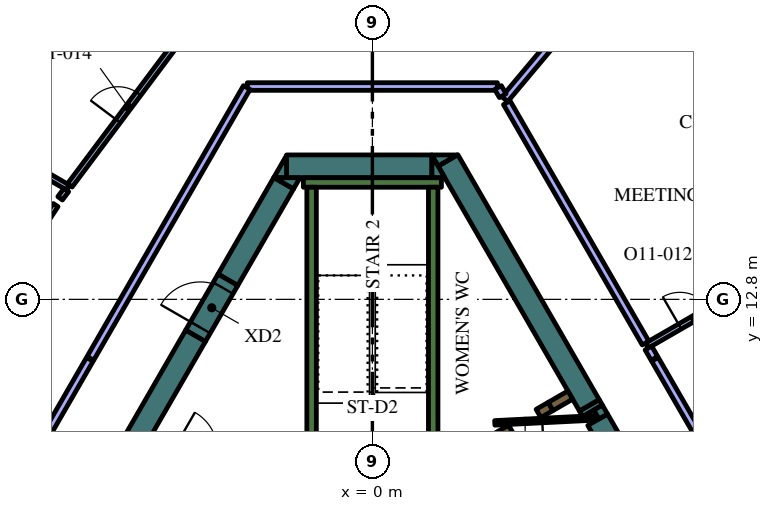
"""IFC4 building model, lengths in metres.
Left out: names, types, materials, properties, quantities, classifications, styles, units other than length and angle.
Written with IfcOpenShell. Run it as: python <this file> out.ifc"""

import sys

from ifc_helpers import new_model, si_unit, direction, frame, frame_2d, origin, place, context, subcontext, project, spatial, polyline, rectangle, outline, extrude, element, fill, save


model = new_model("IFC4")
c1 = context("Model", 3, precision=1e-05, world=origin(), true_north=direction((0.0, 1.0)))
c2 = subcontext(c1, "Body", "Model", "MODEL_VIEW")
j1 = project(units=[si_unit("LENGTHUNIT", "METRE"), si_unit("PLANEANGLEUNIT", "RADIAN")], contexts=[c1])
p1 = place(None, origin())
s1 = spatial("IfcSite", under=j1, at=p1, CompositionType="ELEMENT")
p2 = place(p1, origin())
s2 = spatial("IfcBuilding", under=s1, at=p2, CompositionType="ELEMENT")
p3 = place(p2, frame((0.0, 0.0, 267.0)))
s3 = spatial("IfcBuildingStorey", under=s2, at=p3, CompositionType="ELEMENT", Elevation=267.0)
p4 = place(p3, frame((5.709, 10.012, 0.0), z_axis=(0.0, 0.0, 1.0), x_axis=(0.500399834964, -0.865794435861, 0.0)))
e1 = element("IfcWall", 1, at=p4, inside=s3, PredefinedType="SOLIDWALL", context=c2, shape_type="SweptSolid", body=[
    extrude(rectangle(XDim=0.166, YDim=0.6, at=frame_2d((0.083, 0.0))), origin(), (0.0, 0.0, 1.0), 4.2),
])
p5 = place(p3, frame((5.928, 9.633, 0.0), z_axis=(0.0, 0.0, 1.0), x_axis=(0.499983823482, -0.8660347431, 0.0)))
e2 = element("IfcWall", 2, at=p5, inside=s3, PredefinedType="SOLIDWALL", context=c2, shape_type="SweptSolid", body=[
    extrude(rectangle(XDim=4.528, YDim=0.6, at=frame_2d((2.264, 0.0))), origin(), (0.0, 0.0, 1.0), 4.2),
])
p6 = place(p3, origin())
e3 = element("IfcWall", 3, at=p6, inside=s3, PredefinedType="SOLIDWALL", context=c2, shape_type="SweptSolid", body=[
    extrude(outline(polyline([(6.053, 10.016), (6.187, 9.784), (5.961, 9.654), (5.827, 9.886), (6.053, 10.016)])), origin(), (0.0, 0.0, 1.0), 4.2),
])
p7 = place(p3, frame((1.989, 16.456, 0.0), z_axis=(0.0, 0.0, 1.0), x_axis=(0.499990476767, -0.866030901956, 0.0)))
e4 = element("IfcWall", 4, at=p7, inside=s3, PredefinedType="SOLIDWALL", context=c2, shape_type="SweptSolid", body=[
    extrude(rectangle(XDim=7.438, YDim=0.6, at=frame_2d((3.719, 0.0))), origin(), (0.0, 0.0, 1.0), 4.2),
])
e5 = element("IfcWall", 5, at=p6, inside=s3, PredefinedType="SOLIDWALL", context=c2, shape_type="SweptSolid", body=[
    extrude(outline(polyline([(1.559, 16.6), (2.235, 16.6), (1.728, 16.307), (1.559, 16.6)])), origin(), (0.0, 0.0, 1.0), 4.2),
])
p8 = place(p3, frame((-2.258, 16.3, 0.0), z_axis=(0.0, 0.0, 1.0), x_axis=(1.0, 0.0, 0.0)))
e6 = element("IfcWall", 6, at=p8, inside=s3, PredefinedType="SOLIDWALL", context=c2, shape_type="SweptSolid", body=[
    extrude(rectangle(XDim=3.823, YDim=0.6, at=frame_2d((1.912, 0.0))), origin(), (0.0, 0.0, 1.0), 4.2),
])
e7 = element("IfcWall", 7, at=p6, inside=s3, PredefinedType="SOLIDWALL", context=c2, shape_type="SweptSolid", body=[
    extrude(outline(polyline([(1.905, 16.0), (1.567, 16.0), (1.567, 16.585), (1.905, 16.0)])), origin(), (0.0, 0.0, 1.0), 4.2),
])
e8 = element("IfcWall", 8, at=p6, inside=s3, PredefinedType="SOLIDWALL", context=c2, shape_type="SweptSolid", body=[
    extrude(outline(polyline([(-2.598, 16.0), (-2.26, 16.585), (-2.26, 16.0), (-2.598, 16.0)])), origin(), (0.0, 0.0, 1.0), 4.2),
])
p9 = place(p3, frame((-2.335, 15.855, 0.0), z_axis=(0.0, 0.0, 1.0), x_axis=(-0.499960127962, -0.866048422692, 0.0)))
e9 = element("IfcWall", 9, at=p9, inside=s3, PredefinedType="SOLIDWALL", context=c2, shape_type="SweptSolid", body=[
    extrude(rectangle(XDim=2.934, YDim=0.6, at=frame_2d((1.467, 0.0))), origin(), (0.0, 0.0, 1.0), 4.2),
])
e10 = element("IfcWall", 10, at=p6, inside=s3, PredefinedType="SOLIDWALL", context=c2, shape_type="SweptSolid", body=[
    extrude(outline(polyline([(-1.905, 16.0), (-2.074, 15.707), (-2.581, 16.0), (-1.905, 16.0)])), origin(), (0.0, 0.0, 1.0), 4.2),
])
p10 = place(p3, frame((-4.652, 11.842, 0.0), z_axis=(0.0, 0.0, 1.0), x_axis=(-0.500003640647, -0.866023301845, 0.0)))
e11 = element("IfcWall", 11, at=p10, inside=s3, PredefinedType="SOLIDWALL", context=c2, shape_type="SweptSolid", body=[
    extrude(rectangle(XDim=15.858, YDim=0.6, at=frame_2d((7.929, 0.0))), origin(), (0.0, 0.0, 1.0), 4.2),
])
p11 = place(p3, frame((-1.817, 15.875, 0.0), z_axis=(0.0, 0.0, 1.0), x_axis=(1.0, 0.0, 0.0)))
e12 = element("IfcWall", 12, at=p11, inside=s3, PredefinedType="SOLIDWALL", context=c2, shape_type="SweptSolid", body=[
    extrude(rectangle(XDim=3.634, YDim=0.25, at=frame_2d((1.817, 0.0))), origin(), (0.0, 0.0, 1.0), 4.2),
])
p12 = place(p3, frame((1.6, 8.95, 0.0), z_axis=(0.0, 0.0, 1.0), x_axis=(0.0, 1.0, 0.0)))
e13 = element("IfcWall", 13, at=p12, inside=s3, PredefinedType="SOLIDWALL", context=c2, shape_type="SweptSolid", body=[
    extrude(rectangle(XDim=6.8, YDim=0.25, at=frame_2d((3.4, 0.0))), origin(), (0.0, 0.0, 1.0), 4.2),
])
p13 = place(p3, frame((-1.6, 8.7, 0.0), z_axis=(0.0, 0.0, 1.0), x_axis=(0.0, 1.0, 0.0)))
e14 = element("IfcWall", 14, at=p13, inside=s3, PredefinedType="SOLIDWALL", context=c2, shape_type="SweptSolid", body=[
    extrude(rectangle(XDim=7.05, YDim=0.25, at=frame_2d((3.525, 0.0))), origin(), (0.0, 0.0, 1.0), 4.2),
])
p14 = place(p3, frame((3.647, 9.38, 0.0), z_axis=(0.0, 0.0, 1.0), x_axis=(-0.866025015791, -0.500000672024, 0.0)))
e15 = element("IfcWall", 15, at=p14, inside=s3, PredefinedType="SOLIDWALL", context=c2, shape_type="SweptSolid", body=[
    extrude(rectangle(XDim=3.849, YDim=0.25, at=frame_2d((1.924, 0.0))), origin(), (0.0, 0.0, 1.0), 4.2),
])
p15 = place(p3, frame((4.688, 9.981, 0.0), z_axis=(0.0, 0.0, 1.0), x_axis=(-0.865974312977, -0.500088481434, 0.0)))
e16 = element("IfcWall", 16, at=p15, inside=s3, PredefinedType="SOLIDWALL", context=c2, shape_type="SweptSolid", body=[
    extrude(rectangle(XDim=0.366, YDim=0.25, at=frame_2d((0.183, 0.0))), origin(), (0.0, 0.0, 1.0), 4.2),
])
p16 = place(p3, frame((4.689, 9.982, 0.0), z_axis=(0.0, 0.0, 1.0), x_axis=(0.865947592822, 0.500134748329, 0.0)))
e17 = element("IfcWall", 17, at=p16, inside=s3, PredefinedType="SOLIDWALL", context=c2, shape_type="SweptSolid", body=[
    extrude(rectangle(XDim=0.598, YDim=0.25, at=frame_2d((0.299, 0.0))), origin(), (0.0, 0.0, 1.0), 4.2),
])
p17 = place(p3, frame((5.917, 9.684, 0.0), z_axis=(0.0, 0.0, 1.0), x_axis=(-0.998758194515, -0.049820366212, 0.0)))
e18 = element("IfcWall", 18, at=p17, inside=s3, PredefinedType="PARTITIONING", context=c2, shape_type="SweptSolid", body=[
    extrude(rectangle(XDim=2.7, YDim=0.12, at=frame_2d((1.35, 0.0))), origin(), (0.0, 0.0, 1.0), 3.55),
])
p18 = place(p17, frame((1.45, 0.0, 0.0)))
e19 = element("IfcOpeningElement", 19, at=p18, cuts=e18, PredefinedType="OPENING", context=c2, shape_type="SweptSolid", body=[
    extrude(rectangle(XDim=0.9, YDim=2.1, at=frame_2d((0.45, 1.05))), frame((0.0, 0.07, 0.0), z_axis=(0.0, -1.0, 0.0), x_axis=(1.0, 0.0, 0.0)), (0.0, 0.0, 1.0), 0.14),
])
p19 = place(p3, frame((-4.652, 11.842, 0.0), z_axis=(0.0, 0.0, 1.0), x_axis=(0.500062241894, 0.865989465428, 0.0)))
e20 = element("IfcWall", 20, at=p19, inside=s3, PredefinedType="SOLIDWALL", context=c2, shape_type="SweptSolid", body=[
    extrude(rectangle(XDim=1.7, YDim=0.6, at=frame_2d((0.85, 0.0))), origin(), (0.0, 0.0, 1.0), 4.2),
])
p20 = place(p19, frame((0.25, 0.0, 0.0)))
e21 = element("IfcOpeningElement", 21, at=p20, cuts=e20, PredefinedType="OPENING", context=c2, shape_type="SweptSolid", body=[
    extrude(rectangle(XDim=1.2, YDim=2.1, at=frame_2d((0.6, 1.05))), frame((0.0, 0.31, 0.0), z_axis=(0.0, -1.0, 0.0), x_axis=(1.0, 0.0, 0.0)), (0.0, 0.0, 1.0), 0.62),
])
p21 = place(p3, frame((7.226, 11.585, 0.0), z_axis=(0.0, 0.0, 1.0), x_axis=(0.866021079084, 0.500007490527, 0.0)))
e22 = element("IfcWall", 22, at=p21, inside=s3, PredefinedType="PARTITIONING", context=c2, shape_type="SweptSolid", body=[
    extrude(rectangle(XDim=2.892, YDim=0.15, at=frame_2d((1.446, 0.0))), origin(), (0.0, 0.0, 1.0), 3.55),
])
p22 = place(p21, frame((1.0, 0.0, 0.0)))
e23 = element("IfcOpeningElement", 23, at=p22, cuts=e22, PredefinedType="OPENING", context=c2, shape_type="SweptSolid", body=[
    extrude(rectangle(XDim=0.9, YDim=2.1, at=frame_2d((0.45, 1.05))), frame((0.0, 0.085, 0.0), z_axis=(0.0, -1.0, 0.0), x_axis=(1.0, 0.0, 0.0)), (0.0, 0.0, 1.0), 0.17),
])
p23 = place(p3, frame((13.436, 0.829, 0.0), z_axis=(0.0, 0.0, 1.0), x_axis=(-0.49999894854, 0.866026010844, 0.0)))
e24 = element("IfcWall", 24, at=p23, inside=s3, PredefinedType="PARTITIONING", context=c2, shape_type="SweptSolid", body=[
    extrude(rectangle(XDim=12.0, YDim=0.2, at=frame_2d((6.0, 0.0))), origin(), (0.0, 0.0, 1.0), 3.55),
])
p24 = place(p23, frame((5.5, 0.0, 0.0)))
e25 = element("IfcOpeningElement", 25, at=p24, cuts=e24, PredefinedType="OPENING", context=c2, shape_type="SweptSolid", body=[
    extrude(rectangle(XDim=1.0, YDim=2.1, at=frame_2d((0.5, 1.05))), frame((0.0, 0.11, 0.0), z_axis=(0.0, -1.0, 0.0), x_axis=(1.0, 0.0, 0.0)), (0.0, 0.0, 1.0), 0.22),
])
p25 = place(p3, frame((7.421, 11.247, 0.0), z_axis=(0.0, 0.0, 1.0), x_axis=(-0.500303403544, 0.865850162789, 0.0)))
e26 = element("IfcWall", 26, at=p25, inside=s3, PredefinedType="PARTITIONING", context=c2, shape_type="SweptSolid", body=[
    extrude(rectangle(XDim=0.315, YDim=0.2, at=frame_2d((0.158, 0.0))), origin(), (0.0, 0.0, 1.0), 3.55),
])
p26 = place(p3, frame((3.483, 18.067, 0.0), z_axis=(0.0, 0.0, 1.0), x_axis=(0.642896944312, 0.765952687177, 0.0)))
e27 = element("IfcWall", 27, at=p26, inside=s3, PredefinedType="PARTITIONING", context=c2, shape_type="SweptSolid", body=[
    extrude(rectangle(XDim=2.29, YDim=0.2, at=frame_2d((1.145, 0.0))), origin(), (0.0, 0.0, 1.0), 3.55),
])
p27 = place(p3, frame((7.188, 11.65, 0.0), z_axis=(0.0, 0.0, 1.0), x_axis=(-0.499989634868, 0.866031388014, 0.0)))
e28 = element("IfcWall", 28, at=p27, inside=s3, PredefinedType="PARTITIONING", context=c2, shape_type="SweptSolid", body=[
    extrude(rectangle(XDim=7.303, YDim=0.2, at=frame_2d((3.652, 0.0))), origin(), (0.0, 0.0, 1.0), 3.55),
])
p28 = place(p3, frame((-8.007, 15.74, 0.0), z_axis=(0.0, 0.0, 1.0), x_axis=(-0.866044607523, 0.499966736674, 0.0)))
e29 = element("IfcWall", 29, at=p28, inside=s3, PredefinedType="PARTITIONING", context=c2, shape_type="SweptSolid", body=[
    extrude(rectangle(XDim=3.115, YDim=0.15, at=frame_2d((1.557, 0.0))), origin(), (0.0, 0.0, 1.0), 3.55),
])
p29 = place(p3, frame((-7.962, 15.8, 0.0), z_axis=(0.0, 0.0, 1.0), x_axis=(0.599528135832, 0.800353680785, 0.0)))
e30 = element("IfcWall", 30, at=p29, inside=s3, PredefinedType="PARTITIONING", context=c2, shape_type="SweptSolid", body=[
    extrude(rectangle(XDim=5.217, YDim=0.15, at=frame_2d((2.608, 0.0))), origin(), (0.0, 0.0, 1.0), 3.55),
])
p30 = place(p29, frame((2.116, 0.0, 0.0)))
e31 = element("IfcOpeningElement", 31, at=p30, cuts=e30, PredefinedType="OPENING", context=c2, shape_type="SweptSolid", body=[
    extrude(rectangle(XDim=0.9, YDim=2.1, at=frame_2d((0.45, 1.05))), frame((0.0, 0.085, 0.0), z_axis=(0.0, -1.0, 0.0), x_axis=(1.0, 0.0, 0.0)), (0.0, 0.0, 1.0), 0.17),
])
p31 = place(p3, frame((-8.052, 15.679, 0.0), z_axis=(0.0, 0.0, 1.0), x_axis=(-0.599004157744, -0.800745914136, 0.0)))
e32 = element("IfcWall", 32, at=p31, inside=s3, PredefinedType="PARTITIONING", context=c2, shape_type="SweptSolid", body=[
    extrude(rectangle(XDim=0.275, YDim=0.15, at=frame_2d((0.137, 0.0))), origin(), (0.0, 0.0, 1.0), 3.55),
])
p32 = place(p3, frame((-11.628, 10.29, 0.0), z_axis=(0.0, 0.0, 1.0), x_axis=(0.55074607557, 0.834672846236, 0.0)))
e33 = element("IfcWall", 33, at=p32, inside=s3, PredefinedType="PARTITIONING", context=c2, shape_type="SweptSolid", body=[
    extrude(rectangle(XDim=5.979, YDim=0.15, at=frame_2d((2.99, 0.0))), origin(), (0.0, 0.0, 1.0), 3.55),
])
p33 = place(p32, frame((2.58, 0.0, 0.0)))
e34 = element("IfcOpeningElement", 34, at=p33, cuts=e33, PredefinedType="OPENING", context=c2, shape_type="SweptSolid", body=[
    extrude(rectangle(XDim=0.9, YDim=2.1, at=frame_2d((0.45, 1.05))), frame((0.0, 0.085, 0.0), z_axis=(0.0, -1.0, 0.0), x_axis=(1.0, 0.0, 0.0)), (0.0, 0.0, 1.0), 0.17),
])
p34 = place(p3, frame((-7.436, 11.221, 0.0), z_axis=(0.0, 0.0, 1.0), x_axis=(-0.49999894854, -0.866026010844, 0.0)))
e35 = element("IfcWall", 35, at=p34, inside=s3, PredefinedType="PARTITIONING", context=c2, shape_type="SweptSolid", body=[
    extrude(rectangle(XDim=12.0, YDim=0.2, at=frame_2d((6.0, 0.0))), origin(), (0.0, 0.0, 1.0), 3.55),
])
p35 = place(p34, frame((5.5, 0.0, 0.0)))
e36 = element("IfcOpeningElement", 36, at=p35, cuts=e35, PredefinedType="OPENING", context=c2, shape_type="SweptSolid", body=[
    extrude(rectangle(XDim=1.0, YDim=2.1, at=frame_2d((0.5, 1.05))), frame((0.0, 0.11, 0.0), z_axis=(0.0, -1.0, 0.0), x_axis=(1.0, 0.0, 0.0)), (0.0, 0.0, 1.0), 0.22),
])
p36 = place(p3, frame((3.291, 18.4, 0.0), z_axis=(0.0, 0.0, 1.0), x_axis=(-1.0, 0.0, 0.0)))
e37 = element("IfcWall", 37, at=p36, inside=s3, PredefinedType="PARTITIONING", context=c2, shape_type="SweptSolid", body=[
    extrude(rectangle(XDim=6.582, YDim=0.2, at=frame_2d((3.291, 0.0))), origin(), (0.0, 0.0, 1.0), 3.55),
])
p37 = place(p3, frame((-3.306, 18.374, 0.0), z_axis=(0.0, 0.0, 1.0), x_axis=(-0.499999798456, -0.866025520146, 0.0)))
e38 = element("IfcWall", 38, at=p37, inside=s3, PredefinedType="PARTITIONING", context=c2, shape_type="SweptSolid", body=[
    extrude(rectangle(XDim=8.229, YDim=0.2, at=frame_2d((4.115, 0.0))), origin(), (0.0, 0.0, 1.0), 3.55),
])
p38 = place(p3, frame((3.43, 18.159, 0.0), z_axis=(0.0, 0.0, 1.0), x_axis=(-0.499949632511, 0.866054481515, 0.0)))
e39 = element("IfcWall", 39, at=p38, inside=s3, PredefinedType="PARTITIONING", context=c2, shape_type="SweptSolid", body=[
    extrude(rectangle(XDim=0.248, YDim=0.2, at=frame_2d((0.124, 0.0))), origin(), (0.0, 0.0, 1.0), 3.55),
])
p39 = place(p3, frame((10.938, 17.99, 0.0), z_axis=(0.0, 0.0, 1.0), x_axis=(-0.599559865294, 0.800329911929, 0.0)))
e40 = element("IfcWall", 40, at=p39, inside=s3, PredefinedType="SOLIDWALL", context=c2, shape_type="SweptSolid", body=[
    extrude(rectangle(XDim=5.415, YDim=0.19, at=frame_2d((2.708, 0.0))), origin(), (0.0, 0.0, 1.0), 3.95),
])
p40 = place(p39, frame((0.358, 0.0, 0.6)))
e41 = element("IfcOpeningElement", 41, at=p40, cuts=e40, PredefinedType="OPENING", context=c2, shape_type="SweptSolid", body=[
    extrude(rectangle(XDim=1.5, YDim=2.85, at=frame_2d((0.75, 1.425))), frame((0.0, 0.105, 0.0), z_axis=(0.0, -1.0, 0.0), x_axis=(1.0, 0.0, 0.0)), (0.0, 0.0, 1.0), 0.21),
])
p41 = place(p39, frame((3.593, 0.0, 0.6)))
e42 = element("IfcOpeningElement", 42, at=p41, cuts=e40, PredefinedType="OPENING", context=c2, shape_type="SweptSolid", body=[
    extrude(rectangle(XDim=1.5, YDim=2.85, at=frame_2d((0.75, 1.425))), frame((0.0, 0.105, 0.0), z_axis=(0.0, -1.0, 0.0), x_axis=(1.0, 0.0, 0.0)), (0.0, 0.0, 1.0), 0.21),
])
p42 = place(p3, frame((-7.692, 22.324, 0.0), z_axis=(0.0, 0.0, 1.0), x_axis=(-0.599559865294, -0.800329911929, 0.0)))
e43 = element("IfcWall", 43, at=p42, inside=s3, PredefinedType="SOLIDWALL", context=c2, shape_type="SweptSolid", body=[
    extrude(rectangle(XDim=5.415, YDim=0.19, at=frame_2d((2.708, 0.0))), origin(), (0.0, 0.0, 1.0), 3.95),
])
p43 = place(p42, frame((0.323, 0.0, 0.6)))
e44 = element("IfcOpeningElement", 44, at=p43, cuts=e43, PredefinedType="OPENING", context=c2, shape_type="SweptSolid", body=[
    extrude(rectangle(XDim=1.5, YDim=2.85, at=frame_2d((0.75, 1.425))), frame((0.0, 0.105, 0.0), z_axis=(0.0, -1.0, 0.0), x_axis=(1.0, 0.0, 0.0)), (0.0, 0.0, 1.0), 0.21),
])
p44 = place(p42, frame((3.558, 0.0, 0.6)))
e45 = element("IfcOpeningElement", 45, at=p44, cuts=e43, PredefinedType="OPENING", context=c2, shape_type="SweptSolid", body=[
    extrude(rectangle(XDim=1.5, YDim=2.85, at=frame_2d((0.75, 1.425))), frame((0.0, 0.105, 0.0), z_axis=(0.0, -1.0, 0.0), x_axis=(1.0, 0.0, 0.0)), (0.0, 0.0, 1.0), 0.21),
])
p45 = place(p18, origin())
e46 = element("IfcDoor", 46, at=p45, inside=s3, OperationType="SINGLE_SWING_LEFT", PredefinedType="DOOR", context=c2, shape_type="SweptSolid", body=[
    extrude(rectangle(XDim=0.9, YDim=2.1, at=frame_2d((0.45, 1.05))), frame((0.0, 0.025, 0.0), z_axis=(0.0, -1.0, 0.0), x_axis=(1.0, 0.0, 0.0)), (0.0, 0.0, 1.0), 0.05),
])
fill(e19, e46)
p46 = place(p20, origin())
e47 = element("IfcDoor", 47, at=p46, inside=s3, OperationType="SINGLE_SWING_LEFT", PredefinedType="DOOR", context=c2, shape_type="SweptSolid", body=[
    extrude(rectangle(XDim=1.2, YDim=2.1, at=frame_2d((0.6, 1.05))), frame((0.0, 0.025, 0.0), z_axis=(0.0, -1.0, 0.0), x_axis=(1.0, 0.0, 0.0)), (0.0, 0.0, 1.0), 0.05),
])
fill(e21, e47)
p47 = place(p22, origin())
e48 = element("IfcDoor", 48, at=p47, inside=s3, OperationType="SINGLE_SWING_RIGHT", PredefinedType="DOOR", context=c2, shape_type="SweptSolid", body=[
    extrude(rectangle(XDim=0.9, YDim=2.1, at=frame_2d((0.45, 1.05))), frame((0.0, 0.025, 0.0), z_axis=(0.0, -1.0, 0.0), x_axis=(1.0, 0.0, 0.0)), (0.0, 0.0, 1.0), 0.05),
])
fill(e23, e48)
p48 = place(p30, origin())
e49 = element("IfcDoor", 49, at=p48, inside=s3, OperationType="SINGLE_SWING_LEFT", PredefinedType="DOOR", context=c2, shape_type="SweptSolid", body=[
    extrude(rectangle(XDim=0.9, YDim=2.1, at=frame_2d((0.45, 1.05))), frame((0.0, 0.025, 0.0), z_axis=(0.0, -1.0, 0.0), x_axis=(1.0, 0.0, 0.0)), (0.0, 0.0, 1.0), 0.05),
])
fill(e31, e49)
save(model, sys.argv[1])
